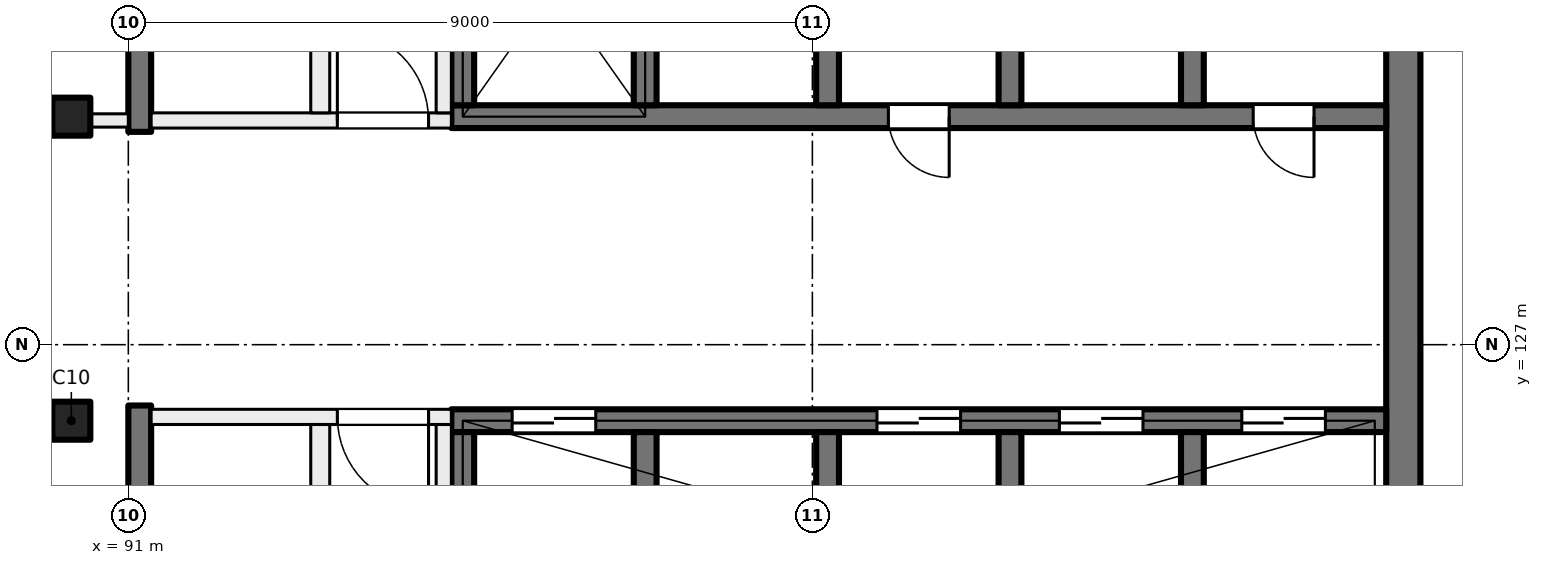
"""IFC4 building model, lengths in metres.
Left out: names, types, materials, properties, quantities, classifications, styles, units other than length and angle.
Written with IfcOpenShell. Run it as: python <this file> out.ifc"""

import sys

from ifc_helpers import new_model, si_unit, direction, frame, frame_2d, origin, origin_2d, place, context, subcontext, project, spatial, rectangle, extrude, element, fill, save


model = new_model("IFC4")
c1 = context("Model", 3, precision=1e-05, world=origin(), true_north=direction((0.0, 1.0)))
c2 = subcontext(c1, "Body", "Model", "MODEL_VIEW")
j1 = project(units=[si_unit("LENGTHUNIT", "METRE"), si_unit("PLANEANGLEUNIT", "RADIAN")], contexts=[c1])
p1 = place(None, origin())
s1 = spatial("IfcSite", under=j1, at=p1, CompositionType="ELEMENT")
p2 = place(p1, origin())
s2 = spatial("IfcBuilding", under=s1, at=p2, CompositionType="ELEMENT")
p3 = place(p2, frame((0.0, 0.0, 261.5)))
s3 = spatial("IfcBuildingStorey", under=s2, at=p3, CompositionType="ELEMENT", Elevation=261.5)
for number, where, z_axis, x_axis in (
    (1, (90.25, 130.0, 0.0), (0.0, 0.0, 1.0), (1.0, 0.0, 0.0)),
    (2, (90.25, 126.0, 0.0), (0.0, 0.0, 1.0), (1.0, 0.0, 0.0)),
):
    element("IfcColumn", number, at=place(p3, frame(where, z_axis=z_axis, x_axis=x_axis)), inside=s3, PredefinedType="COLUMN", context=c2, shape_type="SweptSolid", body=[
        extrude(rectangle(XDim=0.5, YDim=0.5, at=origin_2d()), origin(), (0.0, 0.0, 1.0), 4.0),
    ])
p4 = place(p3, frame((107.775, 135.2, 0.0), z_axis=(0.0, 0.0, 1.0), x_axis=(0.0, -1.0, 0.0)))
e3 = element("IfcWall", 3, at=p4, inside=s3, PredefinedType="SHEAR", context=c2, shape_type="SweptSolid", body=[
    extrude(rectangle(XDim=14.4, YDim=0.45, at=frame_2d((7.2, 0.0))), origin(), (0.0, 0.0, 1.0), 4.0),
])
p5 = place(p3, frame((107.55, 130.0, 0.0), z_axis=(0.0, 0.0, 1.0), x_axis=(-1.0, 0.0, 0.0)))
e4 = element("IfcWall", 4, at=p5, inside=s3, PredefinedType="SHEAR", context=c2, shape_type="SweptSolid", body=[
    extrude(rectangle(XDim=12.3, YDim=0.3, at=frame_2d((6.15, 0.0))), origin(), (0.0, 0.0, 1.0), 4.0),
])
p6 = place(p5, frame((0.95, 0.0, 0.0)))
e5 = element("IfcOpeningElement", 5, at=p6, cuts=e4, PredefinedType="OPENING", context=c2, shape_type="SweptSolid", body=[
    extrude(rectangle(XDim=0.8, YDim=2.1, at=frame_2d((0.4, 1.05))), frame((0.0, 0.16, 0.0), z_axis=(0.0, -1.0, 0.0), x_axis=(1.0, 0.0, 0.0)), (0.0, 0.0, 1.0), 0.32),
])
p7 = place(p5, frame((5.75, 0.0, 0.0)))
e6 = element("IfcOpeningElement", 6, at=p7, cuts=e4, PredefinedType="OPENING", context=c2, shape_type="SweptSolid", body=[
    extrude(rectangle(XDim=0.8, YDim=2.1, at=frame_2d((0.4, 1.05))), frame((0.0, 0.16, 0.0), z_axis=(0.0, -1.0, 0.0), x_axis=(1.0, 0.0, 0.0)), (0.0, 0.0, 1.0), 0.32),
])
for number, where, z_axis, x_axis in (
    (7, (105.0, 133.25, 0.0), (0.0, 0.0, 1.0), (0.0, -1.0, 0.0)),
    (8, (102.6, 133.25, 0.0), (0.0, 0.0, 1.0), (0.0, -1.0, 0.0)),
    (9, (100.2, 133.25, 0.0), (0.0, 0.0, 1.0), (0.0, -1.0, 0.0)),
    (10, (97.8, 133.25, 0.0), (0.0, 0.0, 1.0), (0.0, -1.0, 0.0)),
    (11, (95.4, 133.25, 0.0), (0.0, 0.0, 1.0), (0.0, -1.0, 0.0)),
):
    element("IfcWall", number, at=place(p3, frame(where, z_axis=z_axis, x_axis=x_axis)), inside=s3, PredefinedType="SHEAR", context=c2, shape_type="SweptSolid", body=[
        extrude(rectangle(XDim=3.1, YDim=0.3, at=frame_2d((1.55, 0.0))), origin(), (0.0, 0.0, 1.0), 4.0),
    ])
p8 = place(p3, frame((107.55, 126.0, 0.0), z_axis=(0.0, 0.0, 1.0), x_axis=(-1.0, 0.0, 0.0)))
e12 = element("IfcWall", 12, at=p8, inside=s3, PredefinedType="SHEAR", context=c2, shape_type="SweptSolid", body=[
    extrude(rectangle(XDim=12.3, YDim=0.3, at=frame_2d((6.15, 0.0))), origin(), (0.0, 0.0, 1.0), 4.0),
])
p9 = place(p8, frame((0.8, 0.0, 0.0)))
e13 = element("IfcOpeningElement", 13, at=p9, cuts=e12, PredefinedType="OPENING", context=c2, shape_type="SweptSolid", body=[
    extrude(rectangle(XDim=1.1, YDim=2.1, at=frame_2d((0.55, 1.05))), frame((0.0, 0.16, 0.0), z_axis=(0.0, -1.0, 0.0), x_axis=(1.0, 0.0, 0.0)), (0.0, 0.0, 1.0), 0.32),
])
p10 = place(p8, frame((3.2, 0.0, 0.0)))
e14 = element("IfcOpeningElement", 14, at=p10, cuts=e12, PredefinedType="OPENING", context=c2, shape_type="SweptSolid", body=[
    extrude(rectangle(XDim=1.1, YDim=2.1, at=frame_2d((0.55, 1.05))), frame((0.0, 0.16, 0.0), z_axis=(0.0, -1.0, 0.0), x_axis=(1.0, 0.0, 0.0)), (0.0, 0.0, 1.0), 0.32),
])
p11 = place(p8, frame((5.6, 0.0, 0.0)))
e15 = element("IfcOpeningElement", 15, at=p11, cuts=e12, PredefinedType="OPENING", context=c2, shape_type="SweptSolid", body=[
    extrude(rectangle(XDim=1.1, YDim=2.1, at=frame_2d((0.55, 1.05))), frame((0.0, 0.16, 0.0), z_axis=(0.0, -1.0, 0.0), x_axis=(1.0, 0.0, 0.0)), (0.0, 0.0, 1.0), 0.32),
])
p12 = place(p8, frame((10.4, 0.0, 0.0)))
e16 = element("IfcOpeningElement", 16, at=p12, cuts=e12, PredefinedType="OPENING", context=c2, shape_type="SweptSolid", body=[
    extrude(rectangle(XDim=1.1, YDim=2.1, at=frame_2d((0.55, 1.05))), frame((0.0, 0.16, 0.0), z_axis=(0.0, -1.0, 0.0), x_axis=(1.0, 0.0, 0.0)), (0.0, 0.0, 1.0), 0.32),
])
for number, where, z_axis, x_axis in (
    (17, (105.0, 125.85, 0.0), (0.0, 0.0, 1.0), (0.0, -1.0, 0.0)),
    (18, (102.6, 125.85, 0.0), (0.0, 0.0, 1.0), (0.0, -1.0, 0.0)),
    (19, (100.2, 125.85, 0.0), (0.0, 0.0, 1.0), (0.0, -1.0, 0.0)),
    (20, (97.8, 125.85, 0.0), (0.0, 0.0, 1.0), (0.0, -1.0, 0.0)),
    (21, (95.4, 125.85, 0.0), (0.0, 0.0, 1.0), (0.0, -1.0, 0.0)),
):
    element("IfcWall", number, at=place(p3, frame(where, z_axis=z_axis, x_axis=x_axis)), inside=s3, PredefinedType="SHEAR", context=c2, shape_type="SweptSolid", body=[
        extrude(rectangle(XDim=3.1, YDim=0.3, at=frame_2d((1.55, 0.0))), origin(), (0.0, 0.0, 1.0), 4.0),
    ])
for number, where, z_axis, x_axis in (
    (22, (91.15, 138.55, 0.0), (0.0, 0.0, 1.0), (0.0, -1.0, 0.0)),
    (23, (91.15, 126.2, 0.0), (0.0, 0.0, 1.0), (0.0, -1.0, 0.0)),
):
    element("IfcWall", number, at=place(p3, frame(where, z_axis=z_axis, x_axis=x_axis)), inside=s3, PredefinedType="SHEAR", context=c2, shape_type="SweptSolid", body=[
        extrude(rectangle(XDim=8.75, YDim=0.3, at=frame_2d((4.375, 0.0))), origin(), (0.0, 0.0, 1.0), 4.0),
    ])
p13 = place(p3, frame((95.25, 126.05, 0.0), z_axis=(0.0, 0.0, 1.0), x_axis=(-1.0, 0.0, 0.0)))
e24 = element("IfcWall", 24, at=p13, inside=s3, PredefinedType="PARTITIONING", context=c2, shape_type="SweptSolid", body=[
    extrude(rectangle(XDim=3.95, YDim=0.2, at=frame_2d((1.975, 0.0))), origin(), (0.0, 0.0, 1.0), 3.625),
])
p14 = place(p13, frame((0.3, 0.0, 0.0)))
e25 = element("IfcOpeningElement", 25, at=p14, cuts=e24, PredefinedType="OPENING", context=c2, shape_type="SweptSolid", body=[
    extrude(rectangle(XDim=1.2, YDim=2.1, at=frame_2d((0.6, 1.05))), frame((0.0, 0.11, 0.0), z_axis=(0.0, -1.0, 0.0), x_axis=(1.0, 0.0, 0.0)), (0.0, 0.0, 1.0), 0.22),
])
p15 = place(p3, frame((95.15, 117.45, 0.0), z_axis=(0.0, 0.0, 1.0), x_axis=(0.0, 1.0, 0.0)))
e26 = element("IfcWall", 26, at=p15, inside=s3, PredefinedType="PARTITIONING", context=c2, shape_type="SweptSolid", body=[
    extrude(rectangle(XDim=8.5, YDim=0.2, at=frame_2d((4.25, 0.0))), origin(), (0.0, 0.0, 1.0), 3.625),
])
p16 = place(p15, frame((1.75, 0.0, 0.0)))
e27 = element("IfcOpeningElement", 27, at=p16, cuts=e26, PredefinedType="OPENING", context=c2, shape_type="SweptSolid", body=[
    extrude(rectangle(XDim=1.5, YDim=2.1, at=frame_2d((0.75, 1.05))), frame((0.0, 0.11, 0.0), z_axis=(0.0, -1.0, 0.0), x_axis=(1.0, 0.0, 0.0)), (0.0, 0.0, 1.0), 0.22),
])
p17 = place(p3, frame((93.525, 117.45, 0.0), z_axis=(0.0, 0.0, 1.0), x_axis=(0.0, 1.0, 0.0)))
e28 = element("IfcWall", 28, at=p17, inside=s3, PredefinedType="PARTITIONING", context=c2, shape_type="SweptSolid", body=[
    extrude(rectangle(XDim=8.5, YDim=0.25, at=frame_2d((4.25, 0.0))), origin(), (0.0, 0.0, 1.0), 3.625),
])
p18 = place(p17, frame((6.61, 0.0, 0.0)))
e29 = element("IfcOpeningElement", 29, at=p18, cuts=e28, PredefinedType="OPENING", context=c2, shape_type="SweptSolid", body=[
    extrude(rectangle(XDim=1.0, YDim=2.1, at=frame_2d((0.5, 1.05))), frame((0.0, 0.135, 0.0), z_axis=(0.0, -1.0, 0.0), x_axis=(1.0, 0.0, 0.0)), (0.0, 0.0, 1.0), 0.27),
])
p19 = place(p17, frame((2.41, 0.0, 0.0)))
e30 = element("IfcOpeningElement", 30, at=p19, cuts=e28, PredefinedType="OPENING", context=c2, shape_type="SweptSolid", body=[
    extrude(rectangle(XDim=0.8, YDim=2.1, at=frame_2d((0.4, 1.05))), frame((0.0, 0.135, 0.0), z_axis=(0.0, -1.0, 0.0), x_axis=(1.0, 0.0, 0.0)), (0.0, 0.0, 1.0), 0.27),
])
p20 = place(p3, frame((91.3, 129.95, 0.0), z_axis=(0.0, 0.0, 1.0), x_axis=(1.0, 0.0, 0.0)))
e31 = element("IfcWall", 31, at=p20, inside=s3, PredefinedType="PARTITIONING", context=c2, shape_type="SweptSolid", body=[
    extrude(rectangle(XDim=3.95, YDim=0.2, at=frame_2d((1.975, 0.0))), origin(), (0.0, 0.0, 1.0), 3.625),
])
p21 = place(p20, frame((2.45, 0.0, 0.0)))
e32 = element("IfcOpeningElement", 32, at=p21, cuts=e31, PredefinedType="OPENING", context=c2, shape_type="SweptSolid", body=[
    extrude(rectangle(XDim=1.2, YDim=2.1, at=frame_2d((0.6, 1.05))), frame((0.0, 0.11, 0.0), z_axis=(0.0, -1.0, 0.0), x_axis=(1.0, 0.0, 0.0)), (0.0, 0.0, 1.0), 0.22),
])
p22 = place(p3, frame((95.15, 130.05, 0.0), z_axis=(0.0, 0.0, 1.0), x_axis=(0.0, 1.0, 0.0)))
e33 = element("IfcWall", 33, at=p22, inside=s3, PredefinedType="PARTITIONING", context=c2, shape_type="SweptSolid", body=[
    extrude(rectangle(XDim=8.5, YDim=0.2, at=frame_2d((4.25, 0.0))), origin(), (0.0, 0.0, 1.0), 3.625),
])
p23 = place(p22, frame((5.25, 0.0, 0.0)))
e34 = element("IfcOpeningElement", 34, at=p23, cuts=e33, PredefinedType="OPENING", context=c2, shape_type="SweptSolid", body=[
    extrude(rectangle(XDim=1.5, YDim=2.1, at=frame_2d((0.75, 1.05))), frame((0.0, 0.11, 0.0), z_axis=(0.0, -1.0, 0.0), x_axis=(1.0, 0.0, 0.0)), (0.0, 0.0, 1.0), 0.22),
])
p24 = place(p3, frame((93.525, 130.05, 0.0), z_axis=(0.0, 0.0, 1.0), x_axis=(0.0, 1.0, 0.0)))
e35 = element("IfcWall", 35, at=p24, inside=s3, PredefinedType="PARTITIONING", context=c2, shape_type="SweptSolid", body=[
    extrude(rectangle(XDim=8.5, YDim=0.25, at=frame_2d((4.25, 0.0))), origin(), (0.0, 0.0, 1.0), 3.625),
])
p25 = place(p24, frame((2.41, 0.0, 0.0)))
e36 = element("IfcOpeningElement", 36, at=p25, cuts=e35, PredefinedType="OPENING", context=c2, shape_type="SweptSolid", body=[
    extrude(rectangle(XDim=0.8, YDim=2.1, at=frame_2d((0.4, 1.05))), frame((0.0, 0.135, 0.0), z_axis=(0.0, -1.0, 0.0), x_axis=(1.0, 0.0, 0.0)), (0.0, 0.0, 1.0), 0.27),
])
p26 = place(p24, frame((6.61, 0.0, 0.0)))
e37 = element("IfcOpeningElement", 37, at=p26, cuts=e35, PredefinedType="OPENING", context=c2, shape_type="SweptSolid", body=[
    extrude(rectangle(XDim=1.0, YDim=2.1, at=frame_2d((0.5, 1.05))), frame((0.0, 0.135, 0.0), z_axis=(0.0, -1.0, 0.0), x_axis=(1.0, 0.0, 0.0)), (0.0, 0.0, 1.0), 0.27),
])
p27 = place(p3, frame((85.838, 129.95, 0.0), z_axis=(0.0, 0.0, 1.0), x_axis=(1.0, 0.0, 0.0)))
e38 = element("IfcWall", 38, at=p27, inside=s3, PredefinedType="PARTITIONING", context=c2, shape_type="SweptSolid", body=[
    extrude(rectangle(XDim=5.162, YDim=0.175, at=frame_2d((2.581, 0.0))), origin(), (0.0, 0.0, 1.0), 3.625),
])
p28 = place(p27, frame((1.971, 0.0, 0.0)))
e39 = element("IfcOpeningElement", 39, at=p28, cuts=e38, PredefinedType="OPENING", context=c2, shape_type="SweptSolid", body=[
    extrude(rectangle(XDim=1.2, YDim=2.1, at=frame_2d((0.6, 1.05))), frame((0.0, 0.097, 0.0), z_axis=(0.0, -1.0, 0.0), x_axis=(1.0, 0.0, 0.0)), (0.0, 0.0, 1.0), 0.195),
])
p29 = place(p9, origin())
e40 = element("IfcDoor", 40, at=p29, inside=s3, OperationType="DOUBLE_DOOR_SLIDING", PredefinedType="DOOR", context=c2, shape_type="SweptSolid", body=[
    extrude(rectangle(XDim=1.1, YDim=2.1, at=frame_2d((0.55, 1.05))), frame((0.0, 0.025, 0.0), z_axis=(0.0, -1.0, 0.0), x_axis=(1.0, 0.0, 0.0)), (0.0, 0.0, 1.0), 0.05),
])
fill(e13, e40)
p30 = place(p10, origin())
e41 = element("IfcDoor", 41, at=p30, inside=s3, OperationType="DOUBLE_DOOR_SLIDING", PredefinedType="DOOR", context=c2, shape_type="SweptSolid", body=[
    extrude(rectangle(XDim=1.1, YDim=2.1, at=frame_2d((0.55, 1.05))), frame((0.0, 0.025, 0.0), z_axis=(0.0, -1.0, 0.0), x_axis=(1.0, 0.0, 0.0)), (0.0, 0.0, 1.0), 0.05),
])
fill(e14, e41)
p31 = place(p11, origin())
e42 = element("IfcDoor", 42, at=p31, inside=s3, OperationType="DOUBLE_DOOR_SLIDING", PredefinedType="DOOR", context=c2, shape_type="SweptSolid", body=[
    extrude(rectangle(XDim=1.1, YDim=2.1, at=frame_2d((0.55, 1.05))), frame((0.0, 0.025, 0.0), z_axis=(0.0, -1.0, 0.0), x_axis=(1.0, 0.0, 0.0)), (0.0, 0.0, 1.0), 0.05),
])
fill(e15, e42)
p32 = place(p12, origin())
e43 = element("IfcDoor", 43, at=p32, inside=s3, OperationType="DOUBLE_DOOR_SLIDING", PredefinedType="DOOR", context=c2, shape_type="SweptSolid", body=[
    extrude(rectangle(XDim=1.1, YDim=2.1, at=frame_2d((0.55, 1.05))), frame((0.0, 0.025, 0.0), z_axis=(0.0, -1.0, 0.0), x_axis=(1.0, 0.0, 0.0)), (0.0, 0.0, 1.0), 0.05),
])
fill(e16, e43)
p33 = place(p6, origin())
e44 = element("IfcDoor", 44, at=p33, inside=s3, OperationType="SINGLE_SWING_LEFT", PredefinedType="DOOR", context=c2, shape_type="SweptSolid", body=[
    extrude(rectangle(XDim=0.8, YDim=2.1, at=frame_2d((0.4, 1.05))), frame((0.0, 0.025, 0.0), z_axis=(0.0, -1.0, 0.0), x_axis=(1.0, 0.0, 0.0)), (0.0, 0.0, 1.0), 0.05),
])
fill(e5, e44)
p34 = place(p7, origin())
e45 = element("IfcDoor", 45, at=p34, inside=s3, OperationType="SINGLE_SWING_RIGHT", PredefinedType="DOOR", context=c2, shape_type="SweptSolid", body=[
    extrude(rectangle(XDim=0.8, YDim=2.1, at=frame_2d((0.4, 1.05))), frame((0.0, 0.025, 0.0), z_axis=(0.0, -1.0, 0.0), x_axis=(1.0, 0.0, 0.0)), (0.0, 0.0, 1.0), 0.05),
])
fill(e6, e45)
p35 = place(p14, origin())
e46 = element("IfcDoor", 46, at=p35, inside=s3, OperationType="DOUBLE_DOOR_SINGLE_SWING", PredefinedType="DOOR", context=c2, shape_type="SweptSolid", body=[
    extrude(rectangle(XDim=1.2, YDim=2.1, at=frame_2d((0.6, 1.05))), frame((0.0, 0.025, 0.0), z_axis=(0.0, -1.0, 0.0), x_axis=(1.0, 0.0, 0.0)), (0.0, 0.0, 1.0), 0.05),
])
fill(e25, e46)
p36 = place(p21, origin())
e47 = element("IfcDoor", 47, at=p36, inside=s3, OperationType="DOUBLE_DOOR_SINGLE_SWING", PredefinedType="DOOR", context=c2, shape_type="SweptSolid", body=[
    extrude(rectangle(XDim=1.2, YDim=2.1, at=frame_2d((0.6, 1.05))), frame((0.0, 0.025, 0.0), z_axis=(0.0, -1.0, 0.0), x_axis=(1.0, 0.0, 0.0)), (0.0, 0.0, 1.0), 0.05),
])
fill(e32, e47)
save(model, sys.argv[1])
